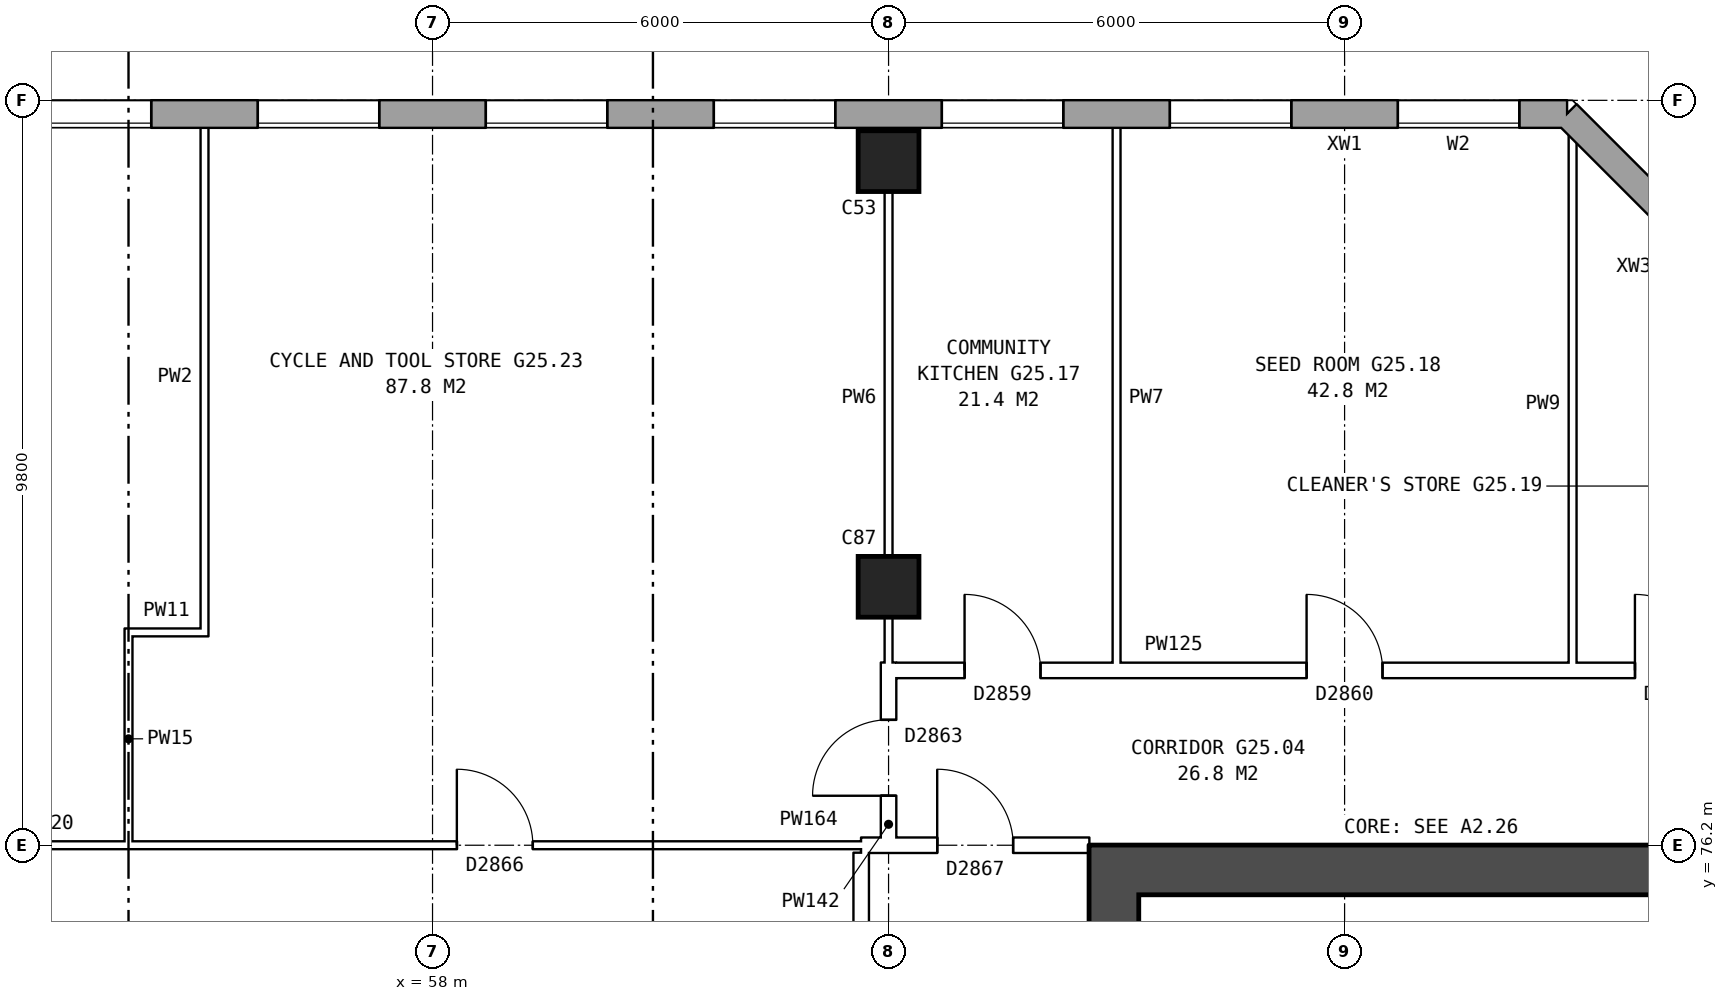
"""IFC4 building model, lengths in metres.
Left out: names, types, materials, properties, quantities, classifications, styles, units other than length and angle.
Written with IfcOpenShell. Run it as: python <this file> out.ifc"""

import sys

from ifc_helpers import new_model, si_unit, direction, frame, frame_2d, origin, origin_2d, place, context, subcontext, project, spatial, rectangle, extrude, element, fill, save


model = new_model("IFC4")
c1 = context("Model", 3, precision=1e-05, world=origin(), true_north=direction((0.0, 1.0)))
c2 = subcontext(c1, "Body", "Model", "MODEL_VIEW")
j1 = project(units=[si_unit("LENGTHUNIT", "METRE"), si_unit("PLANEANGLEUNIT", "RADIAN")], contexts=[c1])
p1 = place(None, origin())
s1 = spatial("IfcSite", under=j1, at=p1, CompositionType="ELEMENT")
p2 = place(p1, origin())
s2 = spatial("IfcBuilding", under=s1, at=p2, CompositionType="ELEMENT")
p3 = place(p2, frame((0.0, 0.0, 90.2)))
s3 = spatial("IfcBuildingStorey", under=s2, at=p3, CompositionType="ELEMENT", Elevation=90.2)
for number, where, z_axis, x_axis in (
    (1, (64.0, 79.6, 0.0), (0.0, 0.0, 1.0), (1.0, 0.0, 0.0)),
    (2, (64.0, 85.2, 0.0), (0.0, 0.0, 1.0), (1.0, 0.0, 0.0)),
):
    element("IfcColumn", number, at=place(p3, frame(where, z_axis=z_axis, x_axis=x_axis)), inside=s3, PredefinedType="COLUMN", context=c2, shape_type="SweptSolid", body=[
        extrude(rectangle(XDim=0.8, YDim=0.8, at=origin_2d()), origin(), (0.0, 0.0, 1.0), 5.6),
    ])
p4 = place(p3, frame((75.82, 82.925, 0.0), z_axis=(0.0, 0.0, 1.0), x_axis=(-0.707106781187, 0.707106781187, 0.0)))
e3 = element("IfcWall", 3, at=p4, inside=s3, PredefinedType="STANDARD", context=c2, shape_type="SweptSolid", body=[
    extrude(rectangle(XDim=4.094, YDim=0.36, at=frame_2d((2.047, 0.0))), origin(), (0.0, 0.0, 1.0), 5.6),
])
p5 = place(p3, frame((72.925, 85.82, 0.0), z_axis=(0.0, 0.0, 1.0), x_axis=(-1.0, 0.0, 0.0)))
e4 = element("IfcWall", 4, at=p5, inside=s3, PredefinedType="STANDARD", context=c2, shape_type="SweptSolid", body=[
    extrude(rectangle(XDim=44.851, YDim=0.36, at=frame_2d((22.425, 0.0))), origin(), (0.0, 0.0, 1.0), 5.6),
])
p6 = place(p5, frame((0.625, 0.0, 0.15)))
e5 = element("IfcOpeningElement", 5, at=p6, cuts=e4, PredefinedType="OPENING", context=c2, shape_type="SweptSolid", body=[
    extrude(rectangle(XDim=1.6, YDim=2.4, at=frame_2d((0.8, 1.2))), frame((0.0, 0.19, 0.0), z_axis=(0.0, -1.0, 0.0), x_axis=(1.0, 0.0, 0.0)), (0.0, 0.0, 1.0), 0.38),
])
p7 = place(p5, frame((3.625, 0.0, 0.15)))
e6 = element("IfcOpeningElement", 6, at=p7, cuts=e4, PredefinedType="OPENING", context=c2, shape_type="SweptSolid", body=[
    extrude(rectangle(XDim=1.6, YDim=2.4, at=frame_2d((0.8, 1.2))), frame((0.0, 0.19, 0.0), z_axis=(0.0, -1.0, 0.0), x_axis=(1.0, 0.0, 0.0)), (0.0, 0.0, 1.0), 0.38),
])
p8 = place(p5, frame((6.625, 0.0, 0.15)))
e7 = element("IfcOpeningElement", 7, at=p8, cuts=e4, PredefinedType="OPENING", context=c2, shape_type="SweptSolid", body=[
    extrude(rectangle(XDim=1.6, YDim=2.4, at=frame_2d((0.8, 1.2))), frame((0.0, 0.19, 0.0), z_axis=(0.0, -1.0, 0.0), x_axis=(1.0, 0.0, 0.0)), (0.0, 0.0, 1.0), 0.38),
])
p9 = place(p5, frame((9.625, 0.0, 0.15)))
e8 = element("IfcOpeningElement", 8, at=p9, cuts=e4, PredefinedType="OPENING", context=c2, shape_type="SweptSolid", body=[
    extrude(rectangle(XDim=1.6, YDim=2.4, at=frame_2d((0.8, 1.2))), frame((0.0, 0.19, 0.0), z_axis=(0.0, -1.0, 0.0), x_axis=(1.0, 0.0, 0.0)), (0.0, 0.0, 1.0), 0.38),
])
p10 = place(p5, frame((12.625, 0.0, 0.15)))
e9 = element("IfcOpeningElement", 9, at=p10, cuts=e4, PredefinedType="OPENING", context=c2, shape_type="SweptSolid", body=[
    extrude(rectangle(XDim=1.6, YDim=2.4, at=frame_2d((0.8, 1.2))), frame((0.0, 0.19, 0.0), z_axis=(0.0, -1.0, 0.0), x_axis=(1.0, 0.0, 0.0)), (0.0, 0.0, 1.0), 0.38),
])
p11 = place(p5, frame((15.625, 0.0, 0.15)))
e10 = element("IfcOpeningElement", 10, at=p11, cuts=e4, PredefinedType="OPENING", context=c2, shape_type="SweptSolid", body=[
    extrude(rectangle(XDim=1.6, YDim=2.4, at=frame_2d((0.8, 1.2))), frame((0.0, 0.19, 0.0), z_axis=(0.0, -1.0, 0.0), x_axis=(1.0, 0.0, 0.0)), (0.0, 0.0, 1.0), 0.38),
])
p12 = place(p5, frame((18.625, 0.0, 0.15)))
e11 = element("IfcOpeningElement", 11, at=p12, cuts=e4, PredefinedType="OPENING", context=c2, shape_type="SweptSolid", body=[
    extrude(rectangle(XDim=1.6, YDim=2.4, at=frame_2d((0.8, 1.2))), frame((0.0, 0.19, 0.0), z_axis=(0.0, -1.0, 0.0), x_axis=(1.0, 0.0, 0.0)), (0.0, 0.0, 1.0), 0.38),
])
p13 = place(p5, frame((21.625, 0.0, 0.15)))
e12 = element("IfcOpeningElement", 12, at=p13, cuts=e4, PredefinedType="OPENING", context=c2, shape_type="SweptSolid", body=[
    extrude(rectangle(XDim=1.6, YDim=2.4, at=frame_2d((0.8, 1.2))), frame((0.0, 0.19, 0.0), z_axis=(0.0, -1.0, 0.0), x_axis=(1.0, 0.0, 0.0)), (0.0, 0.0, 1.0), 0.38),
])
p14 = place(p5, frame((24.625, 0.0, 0.15)))
e13 = element("IfcOpeningElement", 13, at=p14, cuts=e4, PredefinedType="OPENING", context=c2, shape_type="SweptSolid", body=[
    extrude(rectangle(XDim=1.6, YDim=2.4, at=frame_2d((0.8, 1.2))), frame((0.0, 0.19, 0.0), z_axis=(0.0, -1.0, 0.0), x_axis=(1.0, 0.0, 0.0)), (0.0, 0.0, 1.0), 0.38),
])
p15 = place(p5, frame((27.625, 0.0, 0.15)))
e14 = element("IfcOpeningElement", 14, at=p15, cuts=e4, PredefinedType="OPENING", context=c2, shape_type="SweptSolid", body=[
    extrude(rectangle(XDim=1.6, YDim=2.4, at=frame_2d((0.8, 1.2))), frame((0.0, 0.19, 0.0), z_axis=(0.0, -1.0, 0.0), x_axis=(1.0, 0.0, 0.0)), (0.0, 0.0, 1.0), 0.38),
])
p16 = place(p5, frame((30.625, 0.0, 0.15)))
e15 = element("IfcOpeningElement", 15, at=p16, cuts=e4, PredefinedType="OPENING", context=c2, shape_type="SweptSolid", body=[
    extrude(rectangle(XDim=1.6, YDim=2.4, at=frame_2d((0.8, 1.2))), frame((0.0, 0.19, 0.0), z_axis=(0.0, -1.0, 0.0), x_axis=(1.0, 0.0, 0.0)), (0.0, 0.0, 1.0), 0.38),
])
p17 = place(p5, frame((33.625, 0.0, 0.15)))
e16 = element("IfcOpeningElement", 16, at=p17, cuts=e4, PredefinedType="OPENING", context=c2, shape_type="SweptSolid", body=[
    extrude(rectangle(XDim=1.6, YDim=2.4, at=frame_2d((0.8, 1.2))), frame((0.0, 0.19, 0.0), z_axis=(0.0, -1.0, 0.0), x_axis=(1.0, 0.0, 0.0)), (0.0, 0.0, 1.0), 0.38),
])
p18 = place(p5, frame((36.625, 0.0, 0.15)))
e17 = element("IfcOpeningElement", 17, at=p18, cuts=e4, PredefinedType="OPENING", context=c2, shape_type="SweptSolid", body=[
    extrude(rectangle(XDim=1.6, YDim=2.4, at=frame_2d((0.8, 1.2))), frame((0.0, 0.19, 0.0), z_axis=(0.0, -1.0, 0.0), x_axis=(1.0, 0.0, 0.0)), (0.0, 0.0, 1.0), 0.38),
])
p19 = place(p5, frame((39.625, 0.0, 0.15)))
e18 = element("IfcOpeningElement", 18, at=p19, cuts=e4, PredefinedType="OPENING", context=c2, shape_type="SweptSolid", body=[
    extrude(rectangle(XDim=1.6, YDim=2.4, at=frame_2d((0.8, 1.2))), frame((0.0, 0.19, 0.0), z_axis=(0.0, -1.0, 0.0), x_axis=(1.0, 0.0, 0.0)), (0.0, 0.0, 1.0), 0.38),
])
p20 = place(p5, frame((42.625, 0.0, 0.15)))
e19 = element("IfcOpeningElement", 19, at=p20, cuts=e4, PredefinedType="OPENING", context=c2, shape_type="SweptSolid", body=[
    extrude(rectangle(XDim=1.6, YDim=2.4, at=frame_2d((0.8, 1.2))), frame((0.0, 0.19, 0.0), z_axis=(0.0, -1.0, 0.0), x_axis=(1.0, 0.0, 0.0)), (0.0, 0.0, 1.0), 0.38),
])
p21 = place(p3, frame((66.965, 64.45, 0.0), z_axis=(0.0, 0.0, 1.0), x_axis=(0.0, 1.0, 0.0)))
e20 = element("IfcWall", 20, at=p21, inside=s3, PredefinedType="SHEAR", context=c2, shape_type="SweptSolid", body=[
    extrude(rectangle(XDim=11.1, YDim=0.65, at=frame_2d((5.55, 0.0))), origin(), (0.0, 0.0, 1.0), 5.6),
])
p22 = place(p21, frame((0.675, 0.0, 0.0)))
e21 = element("IfcOpeningElement", 21, at=p22, cuts=e20, PredefinedType="OPENING", context=c2, shape_type="SweptSolid", body=[
    extrude(rectangle(XDim=1.1, YDim=2.1, at=frame_2d((0.55, 1.05))), frame((0.0, 0.335, 0.0), z_axis=(0.0, -1.0, 0.0), x_axis=(1.0, 0.0, 0.0)), (0.0, 0.0, 1.0), 0.67),
])
p23 = place(p21, frame((9.25, 0.0, 0.0)))
e22 = element("IfcOpeningElement", 22, at=p23, cuts=e20, PredefinedType="OPENING", context=c2, shape_type="SweptSolid", body=[
    extrude(rectangle(XDim=1.1, YDim=2.1, at=frame_2d((0.55, 1.05))), frame((0.0, 0.335, 0.0), z_axis=(0.0, -1.0, 0.0), x_axis=(1.0, 0.0, 0.0)), (0.0, 0.0, 1.0), 0.67),
])
p24 = place(p3, frame((66.64, 75.875, 0.0), z_axis=(0.0, 0.0, 1.0), x_axis=(1.0, 0.0, 0.0)))
e23 = element("IfcWall", 23, at=p24, inside=s3, PredefinedType="SHEAR", context=c2, shape_type="SweptSolid", body=[
    extrude(rectangle(XDim=9.0, YDim=0.65, at=frame_2d((4.5, 0.0))), origin(), (0.0, 0.0, 1.0), 5.6),
])
p25 = place(p3, frame((63.64, 63.9, 0.0), z_axis=(0.0, 0.0, 1.0), x_axis=(0.0, 1.0, 0.0)))
e24 = element("IfcWall", 24, at=p25, inside=s3, PredefinedType="PARTITIONING", context=c2, shape_type="SweptSolid", body=[
    extrude(rectangle(XDim=12.2, YDim=0.2, at=frame_2d((6.1, 0.0))), origin(), (0.0, 0.0, 1.0), 5.6),
])
p26 = place(p25, frame((5.1, 0.0, 0.0)))
e25 = element("IfcOpeningElement", 25, at=p26, cuts=e24, PredefinedType="OPENING", context=c2, shape_type="SweptSolid", body=[
    extrude(rectangle(XDim=2.0, YDim=2.1, at=frame_2d((1.0, 1.05))), frame((0.0, 0.11, 0.0), z_axis=(0.0, -1.0, 0.0), x_axis=(1.0, 0.0, 0.0)), (0.0, 0.0, 1.0), 0.22),
])
p27 = place(p3, frame((63.64, 76.2, 0.0), z_axis=(0.0, 0.0, 1.0), x_axis=(1.0, 0.0, 0.0)))
e26 = element("IfcWall", 26, at=p27, inside=s3, PredefinedType="PARTITIONING", context=c2, shape_type="SweptSolid", body=[
    extrude(rectangle(XDim=3.0, YDim=0.2, at=frame_2d((1.5, 0.0))), origin(), (0.0, 0.0, 1.0), 5.6),
])
p28 = place(p27, frame((1.0, 0.0, 0.0)))
e27 = element("IfcOpeningElement", 27, at=p28, cuts=e26, PredefinedType="OPENING", context=c2, shape_type="SweptSolid", body=[
    extrude(rectangle(XDim=1.0, YDim=2.1, at=frame_2d((0.5, 1.05))), frame((0.0, 0.11, 0.0), z_axis=(0.0, -1.0, 0.0), x_axis=(1.0, 0.0, 0.0)), (0.0, 0.0, 1.0), 0.22),
])
p29 = place(p3, frame((44.26, 76.2, 0.0), z_axis=(0.0, 0.0, 1.0), x_axis=(1.0, 0.0, 0.0)))
e28 = element("IfcWall", 28, at=p29, inside=s3, PredefinedType="PARTITIONING", context=c2, shape_type="SweptSolid", body=[
    extrude(rectangle(XDim=19.38, YDim=0.1, at=frame_2d((9.69, 0.0))), origin(), (0.0, 0.0, 1.0), 5.6),
])
p30 = place(p29, frame((4.42, 0.0, 0.0)))
e29 = element("IfcOpeningElement", 29, at=p30, cuts=e28, PredefinedType="OPENING", context=c2, shape_type="SweptSolid", body=[
    extrude(rectangle(XDim=1.0, YDim=2.1, at=frame_2d((0.5, 1.05))), frame((0.0, 0.06, 0.0), z_axis=(0.0, -1.0, 0.0), x_axis=(1.0, 0.0, 0.0)), (0.0, 0.0, 1.0), 0.12),
])
p31 = place(p29, frame((14.06, 0.0, 0.0)))
e30 = element("IfcOpeningElement", 30, at=p31, cuts=e28, PredefinedType="OPENING", context=c2, shape_type="SweptSolid", body=[
    extrude(rectangle(XDim=1.0, YDim=2.1, at=frame_2d((0.5, 1.05))), frame((0.0, 0.06, 0.0), z_axis=(0.0, -1.0, 0.0), x_axis=(1.0, 0.0, 0.0)), (0.0, 0.0, 1.0), 0.12),
])
p32 = place(p3, frame((63.9, 78.5, 0.0), z_axis=(0.0, 0.0, 1.0), x_axis=(1.0, 0.0, 0.0)))
e31 = element("IfcWall", 31, at=p32, inside=s3, PredefinedType="PARTITIONING", context=c2, shape_type="SweptSolid", body=[
    extrude(rectangle(XDim=11.86, YDim=0.2, at=frame_2d((5.93, 0.0))), origin(), (0.0, 0.0, 1.0), 5.6),
])
p33 = place(p32, frame((1.1, 0.0, 0.0)))
e32 = element("IfcOpeningElement", 32, at=p33, cuts=e31, PredefinedType="OPENING", context=c2, shape_type="SweptSolid", body=[
    extrude(rectangle(XDim=1.0, YDim=2.1, at=frame_2d((0.5, 1.05))), frame((0.0, 0.11, 0.0), z_axis=(0.0, -1.0, 0.0), x_axis=(1.0, 0.0, 0.0)), (0.0, 0.0, 1.0), 0.22),
])
p34 = place(p32, frame((5.6, 0.0, 0.0)))
e33 = element("IfcOpeningElement", 33, at=p34, cuts=e31, PredefinedType="OPENING", context=c2, shape_type="SweptSolid", body=[
    extrude(rectangle(XDim=1.0, YDim=2.1, at=frame_2d((0.5, 1.05))), frame((0.0, 0.11, 0.0), z_axis=(0.0, -1.0, 0.0), x_axis=(1.0, 0.0, 0.0)), (0.0, 0.0, 1.0), 0.22),
])
p35 = place(p32, frame((9.92, 0.0, 0.0)))
e34 = element("IfcOpeningElement", 34, at=p35, cuts=e31, PredefinedType="OPENING", context=c2, shape_type="SweptSolid", body=[
    extrude(rectangle(XDim=1.0, YDim=2.1, at=frame_2d((0.5, 1.05))), frame((0.0, 0.11, 0.0), z_axis=(0.0, -1.0, 0.0), x_axis=(1.0, 0.0, 0.0)), (0.0, 0.0, 1.0), 0.22),
])
p36 = place(p3, frame((53.95, 79.0, 0.0), z_axis=(0.0, 0.0, 1.0), x_axis=(1.0, 0.0, 0.0)))
e35 = element("IfcWall", 35, at=p36, inside=s3, PredefinedType="PARTITIONING", context=c2, shape_type="SweptSolid", body=[
    extrude(rectangle(XDim=1.1, YDim=0.1, at=frame_2d((0.55, 0.0))), origin(), (0.0, 0.0, 1.0), 5.6),
])
p37 = place(p3, frame((54.0, 76.15, 0.0), z_axis=(0.0, 0.0, 1.0), x_axis=(0.0, 1.0, 0.0)))
e36 = element("IfcWall", 36, at=p37, inside=s3, PredefinedType="PARTITIONING", context=c2, shape_type="SweptSolid", body=[
    extrude(rectangle(XDim=2.9, YDim=0.1, at=frame_2d((1.45, 0.0))), origin(), (0.0, 0.0, 1.0), 5.6),
])
p38 = place(p3, frame((55.0, 78.95, 0.0), z_axis=(0.0, 0.0, 1.0), x_axis=(0.0, 1.0, 0.0)))
e37 = element("IfcWall", 37, at=p38, inside=s3, PredefinedType="PARTITIONING", context=c2, shape_type="SweptSolid", body=[
    extrude(rectangle(XDim=6.81, YDim=0.1, at=frame_2d((3.405, 0.0))), origin(), (0.0, 0.0, 1.0), 5.6),
])
p39 = place(p3, frame((64.0, 76.1, 0.0), z_axis=(0.0, 0.0, 1.0), x_axis=(0.0, 1.0, 0.0)))
e38 = element("IfcWall", 38, at=p39, inside=s3, PredefinedType="PARTITIONING", context=c2, shape_type="SweptSolid", body=[
    extrude(rectangle(XDim=2.502, YDim=0.2, at=frame_2d((1.251, 0.0))), origin(), (0.0, 0.0, 1.0), 5.6),
])
p40 = place(p39, frame((0.751, 0.0, 0.0)))
e39 = element("IfcOpeningElement", 39, at=p40, cuts=e38, PredefinedType="OPENING", context=c2, shape_type="SweptSolid", body=[
    extrude(rectangle(XDim=1.0, YDim=2.1, at=frame_2d((0.5, 1.05))), frame((0.0, 0.11, 0.0), z_axis=(0.0, -1.0, 0.0), x_axis=(1.0, 0.0, 0.0)), (0.0, 0.0, 1.0), 0.22),
])
p41 = place(p3, frame((64.0, 78.398, 0.0), z_axis=(0.0, 0.0, 1.0), x_axis=(0.0, 1.0, 0.0)))
e40 = element("IfcWall", 40, at=p41, inside=s3, PredefinedType="PARTITIONING", context=c2, shape_type="SweptSolid", body=[
    extrude(rectangle(XDim=7.362, YDim=0.1, at=frame_2d((3.681, 0.0))), origin(), (0.0, 0.0, 1.0), 5.6),
])
p42 = place(p3, frame((67.0, 78.4, 0.0), z_axis=(0.0, 0.0, 1.0), x_axis=(0.0, 1.0, 0.0)))
e41 = element("IfcWall", 41, at=p42, inside=s3, PredefinedType="PARTITIONING", context=c2, shape_type="SweptSolid", body=[
    extrude(rectangle(XDim=7.36, YDim=0.1, at=frame_2d((3.68, 0.0))), origin(), (0.0, 0.0, 1.0), 5.6),
])
p43 = place(p3, frame((73.0, 78.4, 0.0), z_axis=(0.0, 0.0, 1.0), x_axis=(0.0, 1.0, 0.0)))
e42 = element("IfcWall", 42, at=p43, inside=s3, PredefinedType="PARTITIONING", context=c2, shape_type="SweptSolid", body=[
    extrude(rectangle(XDim=7.211, YDim=0.1, at=frame_2d((3.605, 0.0))), origin(), (0.0, 0.0, 1.0), 5.6),
])
p44 = place(p6, origin())
e43 = element("IfcWindow", 43, at=p44, inside=s3, PartitioningType="SINGLE_PANEL", PredefinedType="WINDOW", context=c2, shape_type="SweptSolid", body=[
    extrude(rectangle(XDim=1.6, YDim=2.4, at=frame_2d((0.8, 1.2))), frame((0.0, 0.15, 0.0), z_axis=(0.0, -1.0, 0.0), x_axis=(1.0, 0.0, 0.0)), (0.0, 0.0, 1.0), 0.06),
])
fill(e5, e43)
p45 = place(p7, origin())
e44 = element("IfcWindow", 44, at=p45, inside=s3, PartitioningType="SINGLE_PANEL", PredefinedType="WINDOW", context=c2, shape_type="SweptSolid", body=[
    extrude(rectangle(XDim=1.6, YDim=2.4, at=frame_2d((0.8, 1.2))), frame((0.0, 0.15, 0.0), z_axis=(0.0, -1.0, 0.0), x_axis=(1.0, 0.0, 0.0)), (0.0, 0.0, 1.0), 0.06),
])
fill(e6, e44)
p46 = place(p8, origin())
e45 = element("IfcWindow", 45, at=p46, inside=s3, PartitioningType="SINGLE_PANEL", PredefinedType="WINDOW", context=c2, shape_type="SweptSolid", body=[
    extrude(rectangle(XDim=1.6, YDim=2.4, at=frame_2d((0.8, 1.2))), frame((0.0, 0.15, 0.0), z_axis=(0.0, -1.0, 0.0), x_axis=(1.0, 0.0, 0.0)), (0.0, 0.0, 1.0), 0.06),
])
fill(e7, e45)
p47 = place(p9, origin())
e46 = element("IfcWindow", 46, at=p47, inside=s3, PartitioningType="SINGLE_PANEL", PredefinedType="WINDOW", context=c2, shape_type="SweptSolid", body=[
    extrude(rectangle(XDim=1.6, YDim=2.4, at=frame_2d((0.8, 1.2))), frame((0.0, 0.15, 0.0), z_axis=(0.0, -1.0, 0.0), x_axis=(1.0, 0.0, 0.0)), (0.0, 0.0, 1.0), 0.06),
])
fill(e8, e46)
p48 = place(p10, origin())
e47 = element("IfcWindow", 47, at=p48, inside=s3, PartitioningType="SINGLE_PANEL", PredefinedType="WINDOW", context=c2, shape_type="SweptSolid", body=[
    extrude(rectangle(XDim=1.6, YDim=2.4, at=frame_2d((0.8, 1.2))), frame((0.0, 0.15, 0.0), z_axis=(0.0, -1.0, 0.0), x_axis=(1.0, 0.0, 0.0)), (0.0, 0.0, 1.0), 0.06),
])
fill(e9, e47)
p49 = place(p11, origin())
e48 = element("IfcWindow", 48, at=p49, inside=s3, PartitioningType="SINGLE_PANEL", PredefinedType="WINDOW", context=c2, shape_type="SweptSolid", body=[
    extrude(rectangle(XDim=1.6, YDim=2.4, at=frame_2d((0.8, 1.2))), frame((0.0, 0.15, 0.0), z_axis=(0.0, -1.0, 0.0), x_axis=(1.0, 0.0, 0.0)), (0.0, 0.0, 1.0), 0.06),
])
fill(e10, e48)
p50 = place(p12, origin())
e49 = element("IfcWindow", 49, at=p50, inside=s3, PartitioningType="SINGLE_PANEL", PredefinedType="WINDOW", context=c2, shape_type="SweptSolid", body=[
    extrude(rectangle(XDim=1.6, YDim=2.4, at=frame_2d((0.8, 1.2))), frame((0.0, 0.15, 0.0), z_axis=(0.0, -1.0, 0.0), x_axis=(1.0, 0.0, 0.0)), (0.0, 0.0, 1.0), 0.06),
])
fill(e11, e49)
p51 = place(p28, origin())
e50 = element("IfcDoor", 50, at=p51, inside=s3, OperationType="SINGLE_SWING_LEFT", PredefinedType="DOOR", context=c2, shape_type="SweptSolid", body=[
    extrude(rectangle(XDim=1.0, YDim=2.1, at=frame_2d((0.5, 1.05))), frame((0.0, 0.025, 0.0), z_axis=(0.0, -1.0, 0.0), x_axis=(1.0, 0.0, 0.0)), (0.0, 0.0, 1.0), 0.05),
])
fill(e27, e50)
p52 = place(p31, origin())
e51 = element("IfcDoor", 51, at=p52, inside=s3, OperationType="SINGLE_SWING_LEFT", PredefinedType="DOOR", context=c2, shape_type="SweptSolid", body=[
    extrude(rectangle(XDim=1.0, YDim=2.1, at=frame_2d((0.5, 1.05))), frame((0.0, 0.025, 0.0), z_axis=(0.0, -1.0, 0.0), x_axis=(1.0, 0.0, 0.0)), (0.0, 0.0, 1.0), 0.05),
])
fill(e30, e51)
p53 = place(p33, origin())
e52 = element("IfcDoor", 52, at=p53, inside=s3, OperationType="SINGLE_SWING_LEFT", PredefinedType="DOOR", context=c2, shape_type="SweptSolid", body=[
    extrude(rectangle(XDim=1.0, YDim=2.1, at=frame_2d((0.5, 1.05))), frame((0.0, 0.025, 0.0), z_axis=(0.0, -1.0, 0.0), x_axis=(1.0, 0.0, 0.0)), (0.0, 0.0, 1.0), 0.05),
])
fill(e32, e52)
p54 = place(p34, origin())
e53 = element("IfcDoor", 53, at=p54, inside=s3, OperationType="SINGLE_SWING_LEFT", PredefinedType="DOOR", context=c2, shape_type="SweptSolid", body=[
    extrude(rectangle(XDim=1.0, YDim=2.1, at=frame_2d((0.5, 1.05))), frame((0.0, 0.025, 0.0), z_axis=(0.0, -1.0, 0.0), x_axis=(1.0, 0.0, 0.0)), (0.0, 0.0, 1.0), 0.05),
])
fill(e33, e53)
p55 = place(p35, origin())
e54 = element("IfcDoor", 54, at=p55, inside=s3, OperationType="SINGLE_SWING_LEFT", PredefinedType="DOOR", context=c2, shape_type="SweptSolid", body=[
    extrude(rectangle(XDim=1.0, YDim=2.1, at=frame_2d((0.5, 1.05))), frame((0.0, 0.025, 0.0), z_axis=(0.0, -1.0, 0.0), x_axis=(1.0, 0.0, 0.0)), (0.0, 0.0, 1.0), 0.05),
])
fill(e34, e54)
p56 = place(p40, origin())
e55 = element("IfcDoor", 55, at=p56, inside=s3, OperationType="SINGLE_SWING_LEFT", PredefinedType="DOOR", context=c2, shape_type="SweptSolid", body=[
    extrude(rectangle(XDim=1.0, YDim=2.1, at=frame_2d((0.5, 1.05))), frame((0.0, 0.025, 0.0), z_axis=(0.0, -1.0, 0.0), x_axis=(1.0, 0.0, 0.0)), (0.0, 0.0, 1.0), 0.05),
])
fill(e39, e55)
save(model, sys.argv[1])
